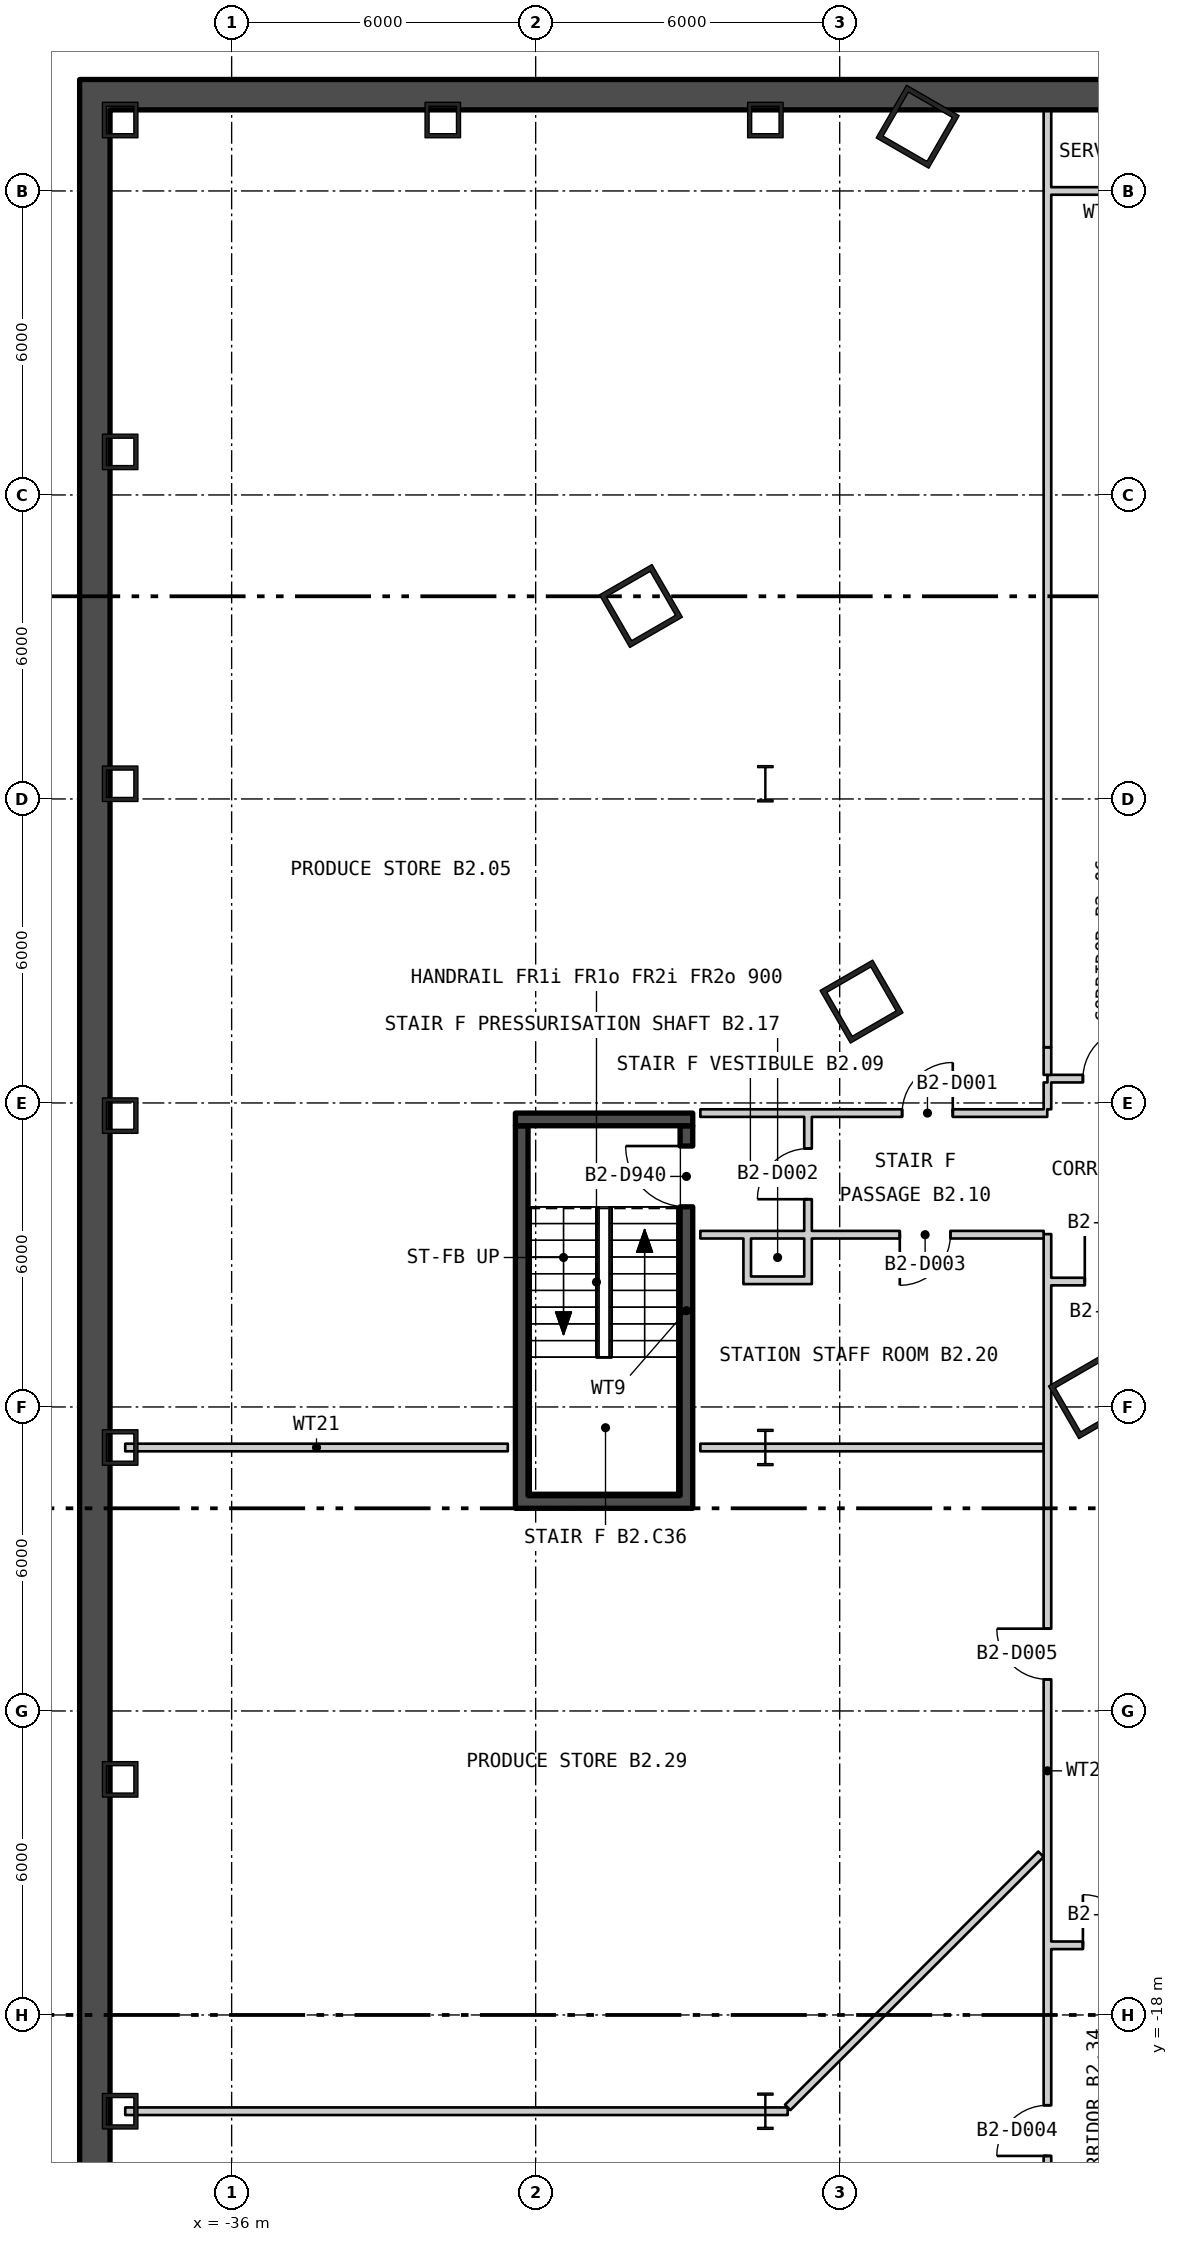
"""IFC4 building model, lengths in metres.
Left out: names, types, materials, properties, quantities, classifications, styles, units other than length and angle.
Written with IfcOpenShell. Run it as: python <this file> out.ifc"""

import sys

from ifc_helpers import new_model, si_unit, direction, frame, frame_2d, origin, origin_2d, place, context, subcontext, project, spatial, rectangle, hollow_rectangle, i_section, extrude, element, fill, save


model = new_model("IFC4")
c1 = context("Model", 3, precision=1e-05, world=origin(), true_north=direction((0.0, 1.0)))
c2 = subcontext(c1, "Body", "Model", "MODEL_VIEW")
j1 = project(units=[si_unit("LENGTHUNIT", "METRE"), si_unit("PLANEANGLEUNIT", "RADIAN")], contexts=[c1])
p1 = place(None, origin())
s1 = spatial("IfcSite", under=j1, at=p1, CompositionType="ELEMENT")
p2 = place(p1, origin())
s2 = spatial("IfcBuilding", under=s1, at=p2, CompositionType="ELEMENT")
p3 = place(p2, frame((0.0, 0.0, -11.4)))
s3 = spatial("IfcBuildingStorey", under=s2, at=p3, CompositionType="ELEMENT", Elevation=-11.4)
for number, where, z_axis, x_axis in (
    (1, (-22.461, 19.267, 0.0), (0.0, 0.0, 1.0), (-0.5, -0.866, 0.0)),
    (2, (-27.923, 9.808, 0.0), (0.0, 0.0, 1.0), (0.5, -0.866, 0.0)),
    (3, (-23.569, 2.0, 0.0), (0.0, 0.0, 1.0), (0.5, -0.866, 0.0)),
    (4, (-19.061, -5.807, 0.0), (0.0, 0.0, 1.0), (0.5, -0.866, 0.0)),
):
    element("IfcColumn", number, at=place(p3, frame(where, z_axis=z_axis, x_axis=x_axis)), inside=s3, PredefinedType="COLUMN", context=c2, shape_type="SweptSolid", body=[
        extrude(hollow_rectangle(XDim=1.2, YDim=1.2, WallThickness=0.1, at=origin_2d()), origin(), (0.0, 0.0, 1.0), 5.7),
    ])
for number, where, z_axis, x_axis in (
    (5, (-25.467, 19.4, 0.0), (0.0, 0.0, 1.0), (-1.0, 0.0, 0.0)),
    (6, (-31.833, 19.4, 0.0), (0.0, 0.0, 1.0), (-1.0, 0.0, 0.0)),
    (7, (-38.2, 19.4, 0.0), (0.0, 0.0, 1.0), (0.0, -1.0, 0.0)),
    (8, (-38.2, 12.85, 0.0), (0.0, 0.0, 1.0), (0.0, -1.0, 0.0)),
    (9, (-38.2, 6.3, 0.0), (0.0, 0.0, 1.0), (0.0, -1.0, 0.0)),
    (10, (-38.2, -0.25, 0.0), (0.0, 0.0, 1.0), (0.0, -1.0, 0.0)),
    (11, (-38.2, -6.8, 0.0), (0.0, 0.0, 1.0), (0.0, -1.0, 0.0)),
    (12, (-38.2, -13.35, 0.0), (0.0, 0.0, 1.0), (0.0, -1.0, 0.0)),
    (13, (-38.2, -19.9, 0.0), (0.0, 0.0, 1.0), (0.0, -1.0, 0.0)),
):
    element("IfcColumn", number, at=place(p3, frame(where, z_axis=z_axis, x_axis=x_axis)), inside=s3, PredefinedType="COLUMN", context=c2, shape_type="SweptSolid", body=[
        extrude(hollow_rectangle(XDim=0.7, YDim=0.7, WallThickness=0.08, at=origin_2d()), origin(), (0.0, 0.0, 1.0), 5.7),
    ])
for number, where, z_axis, x_axis in (
    (14, (-25.467, 6.3, 0.0), (0.0, 0.0, 1.0), (1.0, 0.0, 0.0)),
    (15, (-25.467, -6.8, 0.0), (0.0, 0.0, 1.0), (1.0, 0.0, 0.0)),
    (16, (-25.467, -19.9, 0.0), (0.0, 0.0, 1.0), (1.0, 0.0, 0.0)),
):
    element("IfcColumn", number, at=place(p3, frame(where, z_axis=z_axis, x_axis=x_axis)), inside=s3, PredefinedType="COLUMN", context=c2, shape_type="SweptSolid", body=[
        extrude(i_section(OverallWidth=0.304, OverallDepth=0.716, WebThickness=0.021, FlangeThickness=0.04, at=origin_2d()), origin(), (0.0, 0.0, 1.0), 5.7),
    ])
p4 = place(p3, frame((-39.0, 19.9, -0.4), z_axis=(0.0, 0.0, 1.0), x_axis=(1.0, 0.0, 0.0)))
e17 = element("IfcWall", 17, at=p4, inside=s3, PredefinedType="STANDARD", context=c2, shape_type="SweptSolid", body=[
    extrude(rectangle(XDim=78.0, YDim=0.6, at=frame_2d((39.0, 0.0))), origin(), (0.0, 0.0, 1.0), 5.7),
])
p5 = place(p3, frame((-38.7, -33.2, -0.4), z_axis=(0.0, 0.0, 1.0), x_axis=(0.0, 1.0, 0.0)))
e18 = element("IfcWall", 18, at=p5, inside=s3, PredefinedType="STANDARD", context=c2, shape_type="SweptSolid", body=[
    extrude(rectangle(XDim=52.8, YDim=0.6, at=frame_2d((26.4, 0.0))), origin(), (0.0, 0.0, 1.0), 5.7),
])
p6 = place(p3, frame((-30.275, -7.75, 0.0), z_axis=(0.0, 0.0, 1.0), x_axis=(0.0, 1.0, 0.0)))
e19 = element("IfcWall", 19, at=p6, inside=s3, PredefinedType="SHEAR", context=c2, shape_type="SweptSolid", body=[
    extrude(rectangle(XDim=7.3, YDim=0.25, at=frame_2d((3.65, 0.0))), origin(), (0.0, 0.0, 1.0), 5.25),
])
p7 = place(p3, frame((-27.025, -7.75, 0.0), z_axis=(0.0, 0.0, 1.0), x_axis=(0.0, 1.0, 0.0)))
e20 = element("IfcWall", 20, at=p7, inside=s3, PredefinedType="SHEAR", context=c2, shape_type="SweptSolid", body=[
    extrude(rectangle(XDim=7.3, YDim=0.25, at=frame_2d((3.65, 0.0))), origin(), (0.0, 0.0, 1.0), 5.25),
])
p8 = place(p7, frame((5.7, 0.0, 0.0)))
e21 = element("IfcOpeningElement", 21, at=p8, cuts=e20, PredefinedType="OPENING", context=c2, shape_type="SweptSolid", body=[
    extrude(rectangle(XDim=1.2, YDim=2.1, at=frame_2d((0.6, 1.05))), frame((0.0, 0.135, 0.0), z_axis=(0.0, -1.0, 0.0), x_axis=(1.0, 0.0, 0.0)), (0.0, 0.0, 1.0), 0.27),
])
for number, where, z_axis, x_axis in (
    (22, (-30.4, -7.875, 0.0), (0.0, 0.0, 1.0), (1.0, 0.0, 0.0)),
    (23, (-30.4, -0.325, 0.0), (0.0, 0.0, 1.0), (1.0, 0.0, 0.0)),
):
    element("IfcWall", number, at=place(p3, frame(where, z_axis=z_axis, x_axis=x_axis)), inside=s3, PredefinedType="SHEAR", context=c2, shape_type="SweptSolid", body=[
        extrude(rectangle(XDim=3.5, YDim=0.25, at=frame_2d((1.75, 0.0))), origin(), (0.0, 0.0, 1.0), 5.25),
    ])
p9 = place(p3, frame((-38.1, -19.9, 0.0), z_axis=(0.0, 0.0, 1.0), x_axis=(1.0, 0.0, 0.0)))
e24 = element("IfcWall", 24, at=p9, inside=s3, PredefinedType="PARTITIONING", context=c2, shape_type="SweptSolid", body=[
    extrude(rectangle(XDim=13.074, YDim=0.15, at=frame_2d((6.537, 0.0))), origin(), (0.0, 0.0, 1.0), 5.25),
])
p10 = place(p3, frame((-38.1, -6.8, 0.0), z_axis=(0.0, 0.0, 1.0), x_axis=(1.0, 0.0, 0.0)))
e25 = element("IfcWall", 25, at=p10, inside=s3, PredefinedType="PARTITIONING", context=c2, shape_type="SweptSolid", body=[
    extrude(rectangle(XDim=7.55, YDim=0.15, at=frame_2d((3.775, 0.0))), origin(), (0.0, 0.0, 1.0), 5.25),
])
p11 = place(p3, frame((-26.75, -6.8, 0.0), z_axis=(0.0, 0.0, 1.0), x_axis=(1.0, 0.0, 0.0)))
e26 = element("IfcWall", 26, at=p11, inside=s3, PredefinedType="PARTITIONING", context=c2, shape_type="SweptSolid", body=[
    extrude(rectangle(XDim=6.775, YDim=0.15, at=frame_2d((3.388, 0.0))), origin(), (0.0, 0.0, 1.0), 5.25),
])
p12 = place(p3, frame((-26.75, -2.6, 0.0), z_axis=(0.0, 0.0, 1.0), x_axis=(1.0, 0.0, 0.0)))
e27 = element("IfcWall", 27, at=p12, inside=s3, PredefinedType="PARTITIONING", context=c2, shape_type="SweptSolid", body=[
    extrude(rectangle(XDim=0.913, YDim=0.15, at=frame_2d((0.457, 0.0))), origin(), (0.0, 0.0, 1.0), 5.25),
])
p13 = place(p3, frame((-26.75, -0.2, 0.0), z_axis=(0.0, 0.0, 1.0), x_axis=(1.0, 0.0, 0.0)))
e28 = element("IfcWall", 28, at=p13, inside=s3, PredefinedType="PARTITIONING", context=c2, shape_type="SweptSolid", body=[
    extrude(rectangle(XDim=6.846, YDim=0.15, at=frame_2d((3.423, 0.0))), origin(), (0.0, 0.0, 1.0), 5.25),
])
p14 = place(p13, frame((3.982, 0.0, 0.0)))
e29 = element("IfcOpeningElement", 29, at=p14, cuts=e28, PredefinedType="OPENING", context=c2, shape_type="SweptSolid", body=[
    extrude(rectangle(XDim=1.0, YDim=2.1, at=frame_2d((0.5, 1.05))), frame((0.0, 0.085, 0.0), z_axis=(0.0, -1.0, 0.0), x_axis=(1.0, 0.0, 0.0)), (0.0, 0.0, 1.0), 0.17),
])
p15 = place(p3, frame((-25.9, -3.5, 0.0), z_axis=(0.0, 0.0, 1.0), x_axis=(1.0, 0.0, 0.0)))
e30 = element("IfcWall", 30, at=p15, inside=s3, PredefinedType="PARTITIONING", context=c2, shape_type="SweptSolid", body=[
    extrude(rectangle(XDim=1.35, YDim=0.15, at=frame_2d((0.675, 0.0))), origin(), (0.0, 0.0, 1.0), 5.25),
])
p16 = place(p3, frame((-25.837, -2.6, 0.0), z_axis=(0.0, 0.0, 1.0), x_axis=(1.0, 0.0, 0.0)))
e31 = element("IfcWall", 31, at=p16, inside=s3, PredefinedType="PARTITIONING", context=c2, shape_type="SweptSolid", body=[
    extrude(rectangle(XDim=1.287, YDim=0.15, at=frame_2d((0.643, 0.0))), origin(), (0.0, 0.0, 1.0), 5.25),
])
p17 = place(p3, frame((-25.825, -3.425, 0.0), z_axis=(0.0, 0.0, 1.0), x_axis=(0.0, 1.0, 0.0)))
e32 = element("IfcWall", 32, at=p17, inside=s3, PredefinedType="PARTITIONING", context=c2, shape_type="SweptSolid", body=[
    extrude(rectangle(XDim=0.75, YDim=0.15, at=frame_2d((0.375, 0.0))), origin(), (0.0, 0.0, 1.0), 5.25),
])
p18 = place(p3, frame((-25.026, -19.825, 0.0), z_axis=(0.0, 0.0, 1.0), x_axis=(0.707106781187, 0.707106781187, 0.0)))
e33 = element("IfcWall", 33, at=p18, inside=s3, PredefinedType="PARTITIONING", context=c2, shape_type="SweptSolid", body=[
    extrude(rectangle(XDim=7.068, YDim=0.15, at=frame_2d((3.534, 0.0))), origin(), (0.0, 0.0, 1.0), 5.25),
])
p19 = place(p3, frame((-24.625, -3.425, 0.0), z_axis=(0.0, 0.0, 1.0), x_axis=(0.0, 1.0, 0.0)))
e34 = element("IfcWall", 34, at=p19, inside=s3, PredefinedType="PARTITIONING", context=c2, shape_type="SweptSolid", body=[
    extrude(rectangle(XDim=0.75, YDim=0.15, at=frame_2d((0.375, 0.0))), origin(), (0.0, 0.0, 1.0), 5.25),
])
p20 = place(p3, frame((-24.625, -2.525, 0.0), z_axis=(0.0, 0.0, 1.0), x_axis=(0.0, 1.0, 0.0)))
e35 = element("IfcWall", 35, at=p20, inside=s3, PredefinedType="PARTITIONING", context=c2, shape_type="SweptSolid", body=[
    extrude(rectangle(XDim=2.25, YDim=0.15, at=frame_2d((1.125, 0.0))), origin(), (0.0, 0.0, 1.0), 5.25),
])
p21 = place(p20, frame((0.625, 0.0, 0.0)))
e36 = element("IfcOpeningElement", 36, at=p21, cuts=e35, PredefinedType="OPENING", context=c2, shape_type="SweptSolid", body=[
    extrude(rectangle(XDim=1.0, YDim=2.1, at=frame_2d((0.5, 1.05))), frame((0.0, 0.085, 0.0), z_axis=(0.0, -1.0, 0.0), x_axis=(1.0, 0.0, 0.0)), (0.0, 0.0, 1.0), 0.17),
])
p22 = place(p3, frame((-24.55, -2.6, 0.0), z_axis=(0.0, 0.0, 1.0), x_axis=(1.0, 0.0, 0.0)))
e37 = element("IfcWall", 37, at=p22, inside=s3, PredefinedType="PARTITIONING", context=c2, shape_type="SweptSolid", body=[
    extrude(rectangle(XDim=4.575, YDim=0.15, at=frame_2d((2.288, 0.0))), origin(), (0.0, 0.0, 1.0), 5.25),
])
p23 = place(p22, frame((1.736, 0.0, 0.0)))
e38 = element("IfcOpeningElement", 38, at=p23, cuts=e37, PredefinedType="OPENING", context=c2, shape_type="SweptSolid", body=[
    extrude(rectangle(XDim=1.0, YDim=2.1, at=frame_2d((0.5, 1.05))), frame((0.0, 0.085, 0.0), z_axis=(0.0, -1.0, 0.0), x_axis=(1.0, 0.0, 0.0)), (0.0, 0.0, 1.0), 0.17),
])
p24 = place(p3, frame((-19.975, 18.0, 0.0), z_axis=(0.0, 0.0, 1.0), x_axis=(1.0, 0.0, 0.0)))
e39 = element("IfcWall", 39, at=p24, inside=s3, PredefinedType="PARTITIONING", context=c2, shape_type="SweptSolid", body=[
    extrude(rectangle(XDim=2.475, YDim=0.15, at=frame_2d((1.238, 0.0))), origin(), (0.0, 0.0, 1.0), 5.25),
])
p25 = place(p3, frame((-19.9, -23.775, 0.0), z_axis=(0.0, 0.0, 1.0), x_axis=(0.0, 1.0, 0.0)))
e40 = element("IfcWall", 40, at=p25, inside=s3, PredefinedType="PARTITIONING", context=c2, shape_type="SweptSolid", body=[
    extrude(rectangle(XDim=21.187, YDim=0.15, at=frame_2d((10.594, 0.0))), origin(), (0.0, 0.0, 1.0), 5.25),
])
p26 = place(p25, frame((2.993, 0.0, 0.0)))
e41 = element("IfcOpeningElement", 41, at=p26, cuts=e40, PredefinedType="OPENING", context=c2, shape_type="SweptSolid", body=[
    extrude(rectangle(XDim=1.0, YDim=2.1, at=frame_2d((0.5, 1.05))), frame((0.0, 0.085, 0.0), z_axis=(0.0, -1.0, 0.0), x_axis=(1.0, 0.0, 0.0)), (0.0, 0.0, 1.0), 0.17),
])
p27 = place(p25, frame((12.399, 0.0, 0.0)))
e42 = element("IfcOpeningElement", 42, at=p27, cuts=e40, PredefinedType="OPENING", context=c2, shape_type="SweptSolid", body=[
    extrude(rectangle(XDim=1.0, YDim=2.1, at=frame_2d((0.5, 1.05))), frame((0.0, 0.085, 0.0), z_axis=(0.0, -1.0, 0.0), x_axis=(1.0, 0.0, 0.0)), (0.0, 0.0, 1.0), 0.17),
])
p28 = place(p3, frame((-19.9, -0.125, 0.0), z_axis=(0.0, 0.0, 1.0), x_axis=(0.0, 1.0, 0.0)))
e43 = element("IfcWall", 43, at=p28, inside=s3, PredefinedType="PARTITIONING", context=c2, shape_type="SweptSolid", body=[
    extrude(rectangle(XDim=0.53, YDim=0.15, at=frame_2d((0.265, 0.0))), origin(), (0.0, 0.0, 1.0), 5.25),
])
p29 = place(p3, frame((-19.9, 0.48, 0.0), z_axis=(0.0, 0.0, 1.0), x_axis=(1.0, 0.0, 0.0)))
e44 = element("IfcWall", 44, at=p29, inside=s3, PredefinedType="PARTITIONING", context=c2, shape_type="SweptSolid", body=[
    extrude(rectangle(XDim=2.4, YDim=0.15, at=frame_2d((1.2, 0.0))), origin(), (0.0, 0.0, 1.0), 5.25),
])
p30 = place(p29, frame((0.7, 0.0, 0.0)))
e45 = element("IfcOpeningElement", 45, at=p30, cuts=e44, PredefinedType="OPENING", context=c2, shape_type="SweptSolid", body=[
    extrude(rectangle(XDim=1.0, YDim=2.1, at=frame_2d((0.5, 1.05))), frame((0.0, 0.085, 0.0), z_axis=(0.0, -1.0, 0.0), x_axis=(1.0, 0.0, 0.0)), (0.0, 0.0, 1.0), 0.17),
])
p31 = place(p3, frame((-19.9, 0.555, 0.0), z_axis=(0.0, 0.0, 1.0), x_axis=(0.0, 1.0, 0.0)))
e46 = element("IfcWall", 46, at=p31, inside=s3, PredefinedType="PARTITIONING", context=c2, shape_type="SweptSolid", body=[
    extrude(rectangle(XDim=0.541, YDim=0.15, at=frame_2d((0.271, 0.0))), origin(), (0.0, 0.0, 1.0), 5.25),
])
p32 = place(p3, frame((-19.9, 1.101, 0.0), z_axis=(0.0, 0.0, 1.0), x_axis=(0.0, 1.0, 0.0)))
e47 = element("IfcWall", 47, at=p32, inside=s3, PredefinedType="PARTITIONING", context=c2, shape_type="SweptSolid", body=[
    extrude(rectangle(XDim=16.824, YDim=0.15, at=frame_2d((8.412, 0.0))), origin(), (0.0, 0.0, 1.0), 5.25),
])
p33 = place(p3, frame((-19.9, 18.075, 0.0), z_axis=(0.0, 0.0, 1.0), x_axis=(0.0, 1.0, 0.0)))
e48 = element("IfcWall", 48, at=p33, inside=s3, PredefinedType="PARTITIONING", context=c2, shape_type="SweptSolid", body=[
    extrude(rectangle(XDim=1.675, YDim=0.15, at=frame_2d((0.838, 0.0))), origin(), (0.0, 0.0, 1.0), 5.25),
])
p34 = place(p3, frame((-19.825, -16.625, 0.0), z_axis=(0.0, 0.0, 1.0), x_axis=(1.0, 0.0, 0.0)))
e49 = element("IfcWall", 49, at=p34, inside=s3, PredefinedType="PARTITIONING", context=c2, shape_type="SweptSolid", body=[
    extrude(rectangle(XDim=2.25, YDim=0.15, at=frame_2d((1.125, 0.0))), origin(), (0.0, 0.0, 1.0), 5.25),
])
p35 = place(p34, frame((0.625, 0.0, 0.0)))
e50 = element("IfcOpeningElement", 50, at=p35, cuts=e49, PredefinedType="OPENING", context=c2, shape_type="SweptSolid", body=[
    extrude(rectangle(XDim=1.0, YDim=2.1, at=frame_2d((0.5, 1.05))), frame((0.0, 0.085, 0.0), z_axis=(0.0, -1.0, 0.0), x_axis=(1.0, 0.0, 0.0)), (0.0, 0.0, 1.0), 0.17),
])
p36 = place(p3, frame((-19.825, -3.525, 0.0), z_axis=(0.0, 0.0, 1.0), x_axis=(1.0, 0.0, 0.0)))
e51 = element("IfcWall", 51, at=p36, inside=s3, PredefinedType="PARTITIONING", context=c2, shape_type="SweptSolid", body=[
    extrude(rectangle(XDim=2.325, YDim=0.15, at=frame_2d((1.163, 0.0))), origin(), (0.0, 0.0, 1.0), 5.25),
])
p37 = place(p36, frame((0.662, 0.0, 0.0)))
e52 = element("IfcOpeningElement", 52, at=p37, cuts=e51, PredefinedType="OPENING", context=c2, shape_type="SweptSolid", body=[
    extrude(rectangle(XDim=1.0, YDim=2.1, at=frame_2d((0.5, 1.05))), frame((0.0, 0.085, 0.0), z_axis=(0.0, -1.0, 0.0), x_axis=(1.0, 0.0, 0.0)), (0.0, 0.0, 1.0), 0.17),
])
p38 = place(p8, origin())
e53 = element("IfcDoor", 53, at=p38, inside=s3, OperationType="SINGLE_SWING_LEFT", PredefinedType="DOOR", context=c2, shape_type="SweptSolid", body=[
    extrude(rectangle(XDim=1.2, YDim=2.1, at=frame_2d((0.6, 1.05))), frame((0.0, 0.025, 0.0), z_axis=(0.0, -1.0, 0.0), x_axis=(1.0, 0.0, 0.0)), (0.0, 0.0, 1.0), 0.05),
])
fill(e21, e53)
p39 = place(p14, origin())
e54 = element("IfcDoor", 54, at=p39, inside=s3, OperationType="SINGLE_SWING_LEFT", PredefinedType="DOOR", context=c2, shape_type="SweptSolid", body=[
    extrude(rectangle(XDim=1.0, YDim=2.1, at=frame_2d((0.5, 1.05))), frame((0.0, 0.025, 0.0), z_axis=(0.0, -1.0, 0.0), x_axis=(1.0, 0.0, 0.0)), (0.0, 0.0, 1.0), 0.05),
])
fill(e29, e54)
p40 = place(p21, origin())
e55 = element("IfcDoor", 55, at=p40, inside=s3, OperationType="SINGLE_SWING_RIGHT", PredefinedType="DOOR", context=c2, shape_type="SweptSolid", body=[
    extrude(rectangle(XDim=1.0, YDim=2.1, at=frame_2d((0.5, 1.05))), frame((0.0, 0.025, 0.0), z_axis=(0.0, -1.0, 0.0), x_axis=(1.0, 0.0, 0.0)), (0.0, 0.0, 1.0), 0.05),
])
fill(e36, e55)
p41 = place(p23, origin())
e56 = element("IfcDoor", 56, at=p41, inside=s3, OperationType="SINGLE_SWING_LEFT", PredefinedType="DOOR", context=c2, shape_type="SweptSolid", body=[
    extrude(rectangle(XDim=1.0, YDim=2.1, at=frame_2d((0.5, 1.05))), frame((0.0, 0.025, 0.0), z_axis=(0.0, -1.0, 0.0), x_axis=(1.0, 0.0, 0.0)), (0.0, 0.0, 1.0), 0.05),
])
fill(e38, e56)
p42 = place(p26, origin())
e57 = element("IfcDoor", 57, at=p42, inside=s3, OperationType="SINGLE_SWING_RIGHT", PredefinedType="DOOR", context=c2, shape_type="SweptSolid", body=[
    extrude(rectangle(XDim=1.0, YDim=2.1, at=frame_2d((0.5, 1.05))), frame((0.0, 0.025, 0.0), z_axis=(0.0, -1.0, 0.0), x_axis=(1.0, 0.0, 0.0)), (0.0, 0.0, 1.0), 0.05),
])
fill(e41, e57)
p43 = place(p27, origin())
e58 = element("IfcDoor", 58, at=p43, inside=s3, OperationType="SINGLE_SWING_LEFT", PredefinedType="DOOR", context=c2, shape_type="SweptSolid", body=[
    extrude(rectangle(XDim=1.0, YDim=2.1, at=frame_2d((0.5, 1.05))), frame((0.0, 0.025, 0.0), z_axis=(0.0, -1.0, 0.0), x_axis=(1.0, 0.0, 0.0)), (0.0, 0.0, 1.0), 0.05),
])
fill(e42, e58)
p44 = place(p30, origin())
e59 = element("IfcDoor", 59, at=p44, inside=s3, OperationType="SINGLE_SWING_LEFT", PredefinedType="DOOR", context=c2, shape_type="SweptSolid", body=[
    extrude(rectangle(XDim=1.0, YDim=2.1, at=frame_2d((0.5, 1.05))), frame((0.0, 0.025, 0.0), z_axis=(0.0, -1.0, 0.0), x_axis=(1.0, 0.0, 0.0)), (0.0, 0.0, 1.0), 0.05),
])
fill(e45, e59)
p45 = place(p35, origin())
e60 = element("IfcDoor", 60, at=p45, inside=s3, OperationType="SINGLE_SWING_RIGHT", PredefinedType="DOOR", context=c2, shape_type="SweptSolid", body=[
    extrude(rectangle(XDim=1.0, YDim=2.1, at=frame_2d((0.5, 1.05))), frame((0.0, 0.025, 0.0), z_axis=(0.0, -1.0, 0.0), x_axis=(1.0, 0.0, 0.0)), (0.0, 0.0, 1.0), 0.05),
])
fill(e50, e60)
p46 = place(p37, origin())
e61 = element("IfcDoor", 61, at=p46, inside=s3, OperationType="SINGLE_SWING_RIGHT", PredefinedType="DOOR", context=c2, shape_type="SweptSolid", body=[
    extrude(rectangle(XDim=1.0, YDim=2.1, at=frame_2d((0.5, 1.05))), frame((0.0, 0.025, 0.0), z_axis=(0.0, -1.0, 0.0), x_axis=(1.0, 0.0, 0.0)), (0.0, 0.0, 1.0), 0.05),
])
fill(e52, e61)
save(model, sys.argv[1])
